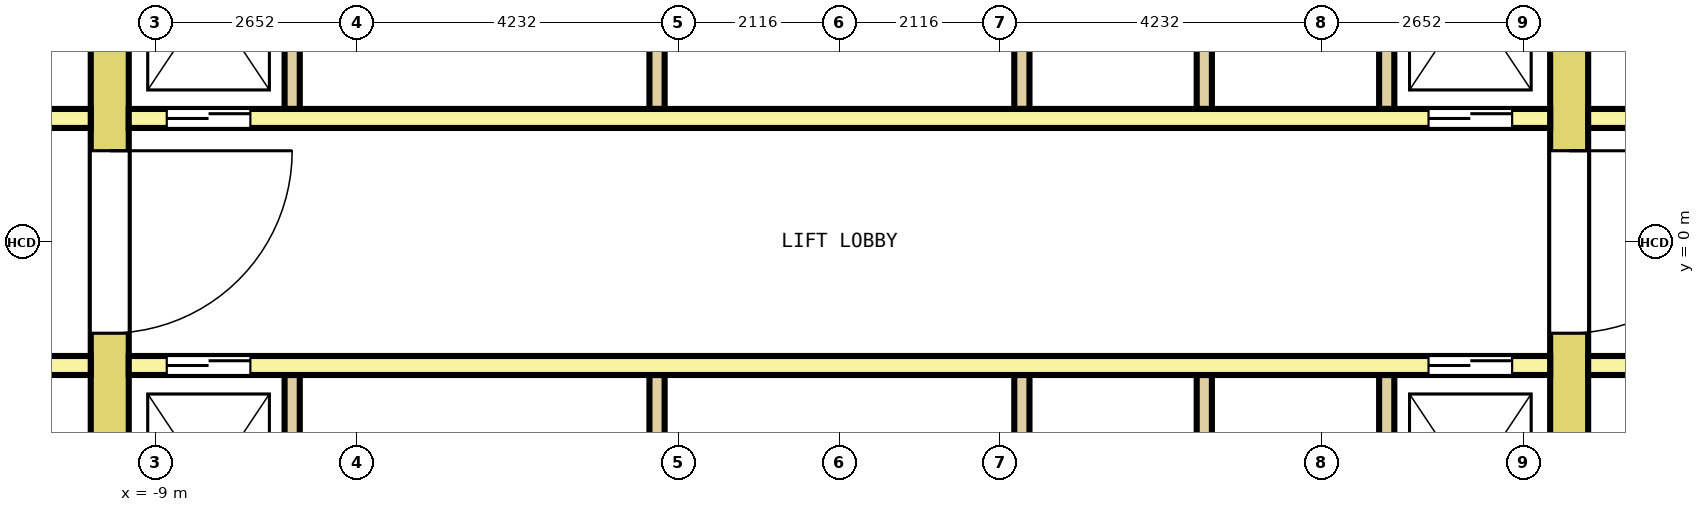
"""IFC4 building model, lengths in metres.
Left out: names, types, materials, properties, quantities, classifications, styles, units other than length and angle.
Written with IfcOpenShell. Run it as: python <this file> out.ifc"""

import sys

from ifc_helpers import new_model, si_unit, direction, frame, frame_2d, origin, place, context, subcontext, project, spatial, rectangle, extrude, element, fill, save


model = new_model("IFC4")
c1 = context("Model", 3, precision=1e-05, world=origin(), true_north=direction((0.0, 1.0)))
c2 = subcontext(c1, "Body", "Model", "MODEL_VIEW")
j1 = project(units=[si_unit("LENGTHUNIT", "METRE"), si_unit("PLANEANGLEUNIT", "RADIAN")], contexts=[c1])
p1 = place(None, origin())
s1 = spatial("IfcSite", under=j1, at=p1, CompositionType="ELEMENT")
p2 = place(p1, origin())
s2 = spatial("IfcBuilding", under=s1, at=p2, CompositionType="ELEMENT")
p3 = place(p2, frame((0.0, 0.0, 32.2)))
s3 = spatial("IfcBuildingStorey", under=s2, at=p3, CompositionType="ELEMENT", Elevation=32.2)
p4 = place(p3, frame((-9.6, -7.7, 0.0), z_axis=(0.0, 0.0, 1.0), x_axis=(0.0, 1.0, 0.0)))
e1 = element("IfcWall", 1, at=p4, inside=s3, PredefinedType="SHEAR", context=c2, shape_type="SweptSolid", body=[
    extrude(rectangle(XDim=15.4, YDim=0.5, at=frame_2d((7.7, 0.0))), origin(), (0.0, 0.0, 1.0), 4.1),
])
p5 = place(p4, frame((6.5, 0.0, 0.0)))
e2 = element("IfcOpeningElement", 2, at=p5, cuts=e1, PredefinedType="OPENING", context=c2, shape_type="SweptSolid", body=[
    extrude(rectangle(XDim=2.4, YDim=2.1, at=frame_2d((1.2, 1.05))), frame((0.0, 0.26, 0.0), z_axis=(0.0, -1.0, 0.0), x_axis=(1.0, 0.0, 0.0)), (0.0, 0.0, 1.0), 0.52),
])
p6 = place(p4, frame((13.4, 0.0, 0.0)))
e3 = element("IfcOpeningElement", 3, at=p6, cuts=e1, PredefinedType="OPENING", context=c2, shape_type="SweptSolid", body=[
    extrude(rectangle(XDim=1.2, YDim=2.1, at=frame_2d((0.6, 1.05))), frame((0.0, 0.26, 0.0), z_axis=(0.0, -1.0, 0.0), x_axis=(1.0, 0.0, 0.0)), (0.0, 0.0, 1.0), 0.52),
])
p7 = place(p4, frame((0.8, 0.0, 0.0)))
e4 = element("IfcOpeningElement", 4, at=p7, cuts=e1, PredefinedType="OPENING", context=c2, shape_type="SweptSolid", body=[
    extrude(rectangle(XDim=1.2, YDim=2.1, at=frame_2d((0.6, 1.05))), frame((0.0, 0.26, 0.0), z_axis=(0.0, -1.0, 0.0), x_axis=(1.0, 0.0, 0.0)), (0.0, 0.0, 1.0), 0.52),
])
p8 = place(p3, frame((9.6, -7.7, 0.0), z_axis=(0.0, 0.0, 1.0), x_axis=(0.0, 1.0, 0.0)))
e5 = element("IfcWall", 5, at=p8, inside=s3, PredefinedType="SHEAR", context=c2, shape_type="SweptSolid", body=[
    extrude(rectangle(XDim=15.4, YDim=0.5, at=frame_2d((7.7, 0.0))), origin(), (0.0, 0.0, 1.0), 4.1),
])
p9 = place(p8, frame((6.5, 0.0, 0.0)))
e6 = element("IfcOpeningElement", 6, at=p9, cuts=e5, PredefinedType="OPENING", context=c2, shape_type="SweptSolid", body=[
    extrude(rectangle(XDim=2.4, YDim=2.1, at=frame_2d((1.2, 1.05))), frame((0.0, 0.26, 0.0), z_axis=(0.0, -1.0, 0.0), x_axis=(1.0, 0.0, 0.0)), (0.0, 0.0, 1.0), 0.52),
])
p10 = place(p8, frame((13.4, 0.0, 0.0)))
e7 = element("IfcOpeningElement", 7, at=p10, cuts=e5, PredefinedType="OPENING", context=c2, shape_type="SweptSolid", body=[
    extrude(rectangle(XDim=1.2, YDim=2.1, at=frame_2d((0.6, 1.05))), frame((0.0, 0.26, 0.0), z_axis=(0.0, -1.0, 0.0), x_axis=(1.0, 0.0, 0.0)), (0.0, 0.0, 1.0), 0.52),
])
p11 = place(p8, frame((0.9, 0.0, 0.0)))
e8 = element("IfcOpeningElement", 8, at=p11, cuts=e5, PredefinedType="OPENING", context=c2, shape_type="SweptSolid", body=[
    extrude(rectangle(XDim=1.0, YDim=2.1, at=frame_2d((0.5, 1.05))), frame((0.0, 0.26, 0.0), z_axis=(0.0, -1.0, 0.0), x_axis=(1.0, 0.0, 0.0)), (0.0, 0.0, 1.0), 0.52),
])
p12 = place(p3, frame((-12.75, 1.625, 0.0), z_axis=(0.0, 0.0, 1.0), x_axis=(1.0, 0.0, 0.0)))
e9 = element("IfcWall", 9, at=p12, inside=s3, PredefinedType="SOLIDWALL", context=c2, shape_type="SweptSolid", body=[
    extrude(rectangle(XDim=2.9, YDim=0.25, at=frame_2d((1.45, 0.0))), origin(), (0.0, 0.0, 1.0), 4.1),
])
p13 = place(p12, frame((0.9, 0.0, 0.0)))
e10 = element("IfcOpeningElement", 10, at=p13, cuts=e9, PredefinedType="OPENING", context=c2, shape_type="SweptSolid", body=[
    extrude(rectangle(XDim=1.1, YDim=2.1, at=frame_2d((0.55, 1.05))), frame((0.0, 0.135, 0.0), z_axis=(0.0, -1.0, 0.0), x_axis=(1.0, 0.0, 0.0)), (0.0, 0.0, 1.0), 0.27),
])
p14 = place(p3, frame((-9.35, 1.625, 0.0), z_axis=(0.0, 0.0, 1.0), x_axis=(1.0, 0.0, 0.0)))
e11 = element("IfcWall", 11, at=p14, inside=s3, PredefinedType="SOLIDWALL", context=c2, shape_type="SweptSolid", body=[
    extrude(rectangle(XDim=18.7, YDim=0.25, at=frame_2d((9.35, 0.0))), origin(), (0.0, 0.0, 1.0), 4.1),
])
p15 = place(p14, frame((0.5, 0.0, 0.0)))
e12 = element("IfcOpeningElement", 12, at=p15, cuts=e11, PredefinedType="OPENING", context=c2, shape_type="SweptSolid", body=[
    extrude(rectangle(XDim=1.1, YDim=2.1, at=frame_2d((0.55, 1.05))), frame((0.0, 0.135, 0.0), z_axis=(0.0, -1.0, 0.0), x_axis=(1.0, 0.0, 0.0)), (0.0, 0.0, 1.0), 0.27),
])
p16 = place(p14, frame((17.1, 0.0, 0.0)))
e13 = element("IfcOpeningElement", 13, at=p16, cuts=e11, PredefinedType="OPENING", context=c2, shape_type="SweptSolid", body=[
    extrude(rectangle(XDim=1.1, YDim=2.1, at=frame_2d((0.55, 1.05))), frame((0.0, 0.135, 0.0), z_axis=(0.0, -1.0, 0.0), x_axis=(1.0, 0.0, 0.0)), (0.0, 0.0, 1.0), 0.27),
])
p17 = place(p3, frame((9.85, 1.625, 0.0), z_axis=(0.0, 0.0, 1.0), x_axis=(1.0, 0.0, 0.0)))
e14 = element("IfcWall", 14, at=p17, inside=s3, PredefinedType="SOLIDWALL", context=c2, shape_type="SweptSolid", body=[
    extrude(rectangle(XDim=2.9, YDim=0.25, at=frame_2d((1.45, 0.0))), origin(), (0.0, 0.0, 1.0), 4.1),
])
p18 = place(p17, frame((0.9, 0.0, 0.0)))
e15 = element("IfcOpeningElement", 15, at=p18, cuts=e14, PredefinedType="OPENING", context=c2, shape_type="SweptSolid", body=[
    extrude(rectangle(XDim=1.1, YDim=2.1, at=frame_2d((0.55, 1.05))), frame((0.0, 0.135, 0.0), z_axis=(0.0, -1.0, 0.0), x_axis=(1.0, 0.0, 0.0)), (0.0, 0.0, 1.0), 0.27),
])
for number, where, z_axis, x_axis in (
    (16, (-7.2, 1.75, 0.0), (0.0, 0.0, 1.0), (0.0, 1.0, 0.0)),
    (17, (-2.4, 1.75, 0.0), (0.0, 0.0, 1.0), (0.0, 1.0, 0.0)),
    (18, (2.4, 1.75, 0.0), (0.0, 0.0, 1.0), (0.0, 1.0, 0.0)),
    (19, (4.8, 1.75, 0.0), (0.0, 0.0, 1.0), (0.0, 1.0, 0.0)),
    (20, (7.2, 1.75, 0.0), (0.0, 0.0, 1.0), (0.0, 1.0, 0.0)),
):
    element("IfcWall", number, at=place(p3, frame(where, z_axis=z_axis, x_axis=x_axis)), inside=s3, PredefinedType="SOLIDWALL", context=c2, shape_type="SweptSolid", body=[
        extrude(rectangle(XDim=2.9, YDim=0.2, at=frame_2d((1.45, 0.0))), origin(), (0.0, 0.0, 1.0), 4.1),
    ])
p19 = place(p3, frame((-12.75, -1.625, 0.0), z_axis=(0.0, 0.0, 1.0), x_axis=(1.0, 0.0, 0.0)))
e21 = element("IfcWall", 21, at=p19, inside=s3, PredefinedType="SOLIDWALL", context=c2, shape_type="SweptSolid", body=[
    extrude(rectangle(XDim=2.9, YDim=0.25, at=frame_2d((1.45, 0.0))), origin(), (0.0, 0.0, 1.0), 4.1),
])
p20 = place(p19, frame((0.9, 0.0, 0.0)))
e22 = element("IfcOpeningElement", 22, at=p20, cuts=e21, PredefinedType="OPENING", context=c2, shape_type="SweptSolid", body=[
    extrude(rectangle(XDim=1.1, YDim=2.1, at=frame_2d((0.55, 1.05))), frame((0.0, 0.135, 0.0), z_axis=(0.0, -1.0, 0.0), x_axis=(1.0, 0.0, 0.0)), (0.0, 0.0, 1.0), 0.27),
])
p21 = place(p3, frame((-9.35, -1.625, 0.0), z_axis=(0.0, 0.0, 1.0), x_axis=(1.0, 0.0, 0.0)))
e23 = element("IfcWall", 23, at=p21, inside=s3, PredefinedType="SOLIDWALL", context=c2, shape_type="SweptSolid", body=[
    extrude(rectangle(XDim=18.7, YDim=0.25, at=frame_2d((9.35, 0.0))), origin(), (0.0, 0.0, 1.0), 4.1),
])
p22 = place(p21, frame((0.5, 0.0, 0.0)))
e24 = element("IfcOpeningElement", 24, at=p22, cuts=e23, PredefinedType="OPENING", context=c2, shape_type="SweptSolid", body=[
    extrude(rectangle(XDim=1.1, YDim=2.1, at=frame_2d((0.55, 1.05))), frame((0.0, 0.135, 0.0), z_axis=(0.0, -1.0, 0.0), x_axis=(1.0, 0.0, 0.0)), (0.0, 0.0, 1.0), 0.27),
])
p23 = place(p21, frame((17.1, 0.0, 0.0)))
e25 = element("IfcOpeningElement", 25, at=p23, cuts=e23, PredefinedType="OPENING", context=c2, shape_type="SweptSolid", body=[
    extrude(rectangle(XDim=1.1, YDim=2.1, at=frame_2d((0.55, 1.05))), frame((0.0, 0.135, 0.0), z_axis=(0.0, -1.0, 0.0), x_axis=(1.0, 0.0, 0.0)), (0.0, 0.0, 1.0), 0.27),
])
p24 = place(p3, frame((9.85, -1.625, 0.0), z_axis=(0.0, 0.0, 1.0), x_axis=(1.0, 0.0, 0.0)))
e26 = element("IfcWall", 26, at=p24, inside=s3, PredefinedType="SOLIDWALL", context=c2, shape_type="SweptSolid", body=[
    extrude(rectangle(XDim=2.9, YDim=0.25, at=frame_2d((1.45, 0.0))), origin(), (0.0, 0.0, 1.0), 4.1),
])
p25 = place(p24, frame((0.9, 0.0, 0.0)))
e27 = element("IfcOpeningElement", 27, at=p25, cuts=e26, PredefinedType="OPENING", context=c2, shape_type="SweptSolid", body=[
    extrude(rectangle(XDim=1.1, YDim=2.1, at=frame_2d((0.55, 1.05))), frame((0.0, 0.135, 0.0), z_axis=(0.0, -1.0, 0.0), x_axis=(1.0, 0.0, 0.0)), (0.0, 0.0, 1.0), 0.27),
])
for number, where, z_axis, x_axis in (
    (28, (-7.2, -4.65, 0.0), (0.0, 0.0, 1.0), (0.0, 1.0, 0.0)),
    (29, (-2.4, -4.65, 0.0), (0.0, 0.0, 1.0), (0.0, 1.0, 0.0)),
    (30, (2.4, -4.65, 0.0), (0.0, 0.0, 1.0), (0.0, 1.0, 0.0)),
    (31, (4.8, -4.65, 0.0), (0.0, 0.0, 1.0), (0.0, 1.0, 0.0)),
    (32, (7.2, -4.65, 0.0), (0.0, 0.0, 1.0), (0.0, 1.0, 0.0)),
):
    element("IfcWall", number, at=place(p3, frame(where, z_axis=z_axis, x_axis=x_axis)), inside=s3, PredefinedType="SOLIDWALL", context=c2, shape_type="SweptSolid", body=[
        extrude(rectangle(XDim=2.9, YDim=0.2, at=frame_2d((1.45, 0.0))), origin(), (0.0, 0.0, 1.0), 4.1),
    ])
p26 = place(p15, origin())
e33 = element("IfcDoor", 33, at=p26, inside=s3, OperationType="DOUBLE_DOOR_SLIDING", PredefinedType="DOOR", context=c2, shape_type="SweptSolid", body=[
    extrude(rectangle(XDim=1.1, YDim=2.1, at=frame_2d((0.55, 1.05))), frame((0.0, 0.075, 0.0), z_axis=(0.0, -1.0, 0.0), x_axis=(1.0, 0.0, 0.0)), (0.0, 0.0, 1.0), 0.15),
])
fill(e12, e33)
p27 = place(p16, origin())
e34 = element("IfcDoor", 34, at=p27, inside=s3, OperationType="DOUBLE_DOOR_SLIDING", PredefinedType="DOOR", context=c2, shape_type="SweptSolid", body=[
    extrude(rectangle(XDim=1.1, YDim=2.1, at=frame_2d((0.55, 1.05))), frame((0.0, 0.075, 0.0), z_axis=(0.0, -1.0, 0.0), x_axis=(1.0, 0.0, 0.0)), (0.0, 0.0, 1.0), 0.15),
])
fill(e13, e34)
p28 = place(p22, origin())
e35 = element("IfcDoor", 35, at=p28, inside=s3, OperationType="DOUBLE_DOOR_SLIDING", PredefinedType="DOOR", context=c2, shape_type="SweptSolid", body=[
    extrude(rectangle(XDim=1.1, YDim=2.1, at=frame_2d((0.55, 1.05))), frame((0.0, 0.075, 0.0), z_axis=(0.0, -1.0, 0.0), x_axis=(1.0, 0.0, 0.0)), (0.0, 0.0, 1.0), 0.15),
])
fill(e24, e35)
p29 = place(p23, origin())
e36 = element("IfcDoor", 36, at=p29, inside=s3, OperationType="DOUBLE_DOOR_SLIDING", PredefinedType="DOOR", context=c2, shape_type="SweptSolid", body=[
    extrude(rectangle(XDim=1.1, YDim=2.1, at=frame_2d((0.55, 1.05))), frame((0.0, 0.075, 0.0), z_axis=(0.0, -1.0, 0.0), x_axis=(1.0, 0.0, 0.0)), (0.0, 0.0, 1.0), 0.15),
])
fill(e25, e36)
p30 = place(p5, origin())
e37 = element("IfcDoor", 37, at=p30, inside=s3, OperationType="DOUBLE_DOOR_SINGLE_SWING", PredefinedType="DOOR", context=c2, shape_type="SweptSolid", body=[
    extrude(rectangle(XDim=2.4, YDim=2.1, at=frame_2d((1.2, 1.05))), frame((0.0, 0.2, 0.0), z_axis=(0.0, -1.0, 0.0), x_axis=(1.0, 0.0, 0.0)), (0.0, 0.0, 1.0), 0.4),
])
fill(e2, e37)
p31 = place(p9, origin())
e38 = element("IfcDoor", 38, at=p31, inside=s3, OperationType="DOUBLE_DOOR_SINGLE_SWING", PredefinedType="DOOR", context=c2, shape_type="SweptSolid", body=[
    extrude(rectangle(XDim=2.4, YDim=2.1, at=frame_2d((1.2, 1.05))), frame((0.0, 0.2, 0.0), z_axis=(0.0, -1.0, 0.0), x_axis=(1.0, 0.0, 0.0)), (0.0, 0.0, 1.0), 0.4),
])
fill(e6, e38)
save(model, sys.argv[1])
